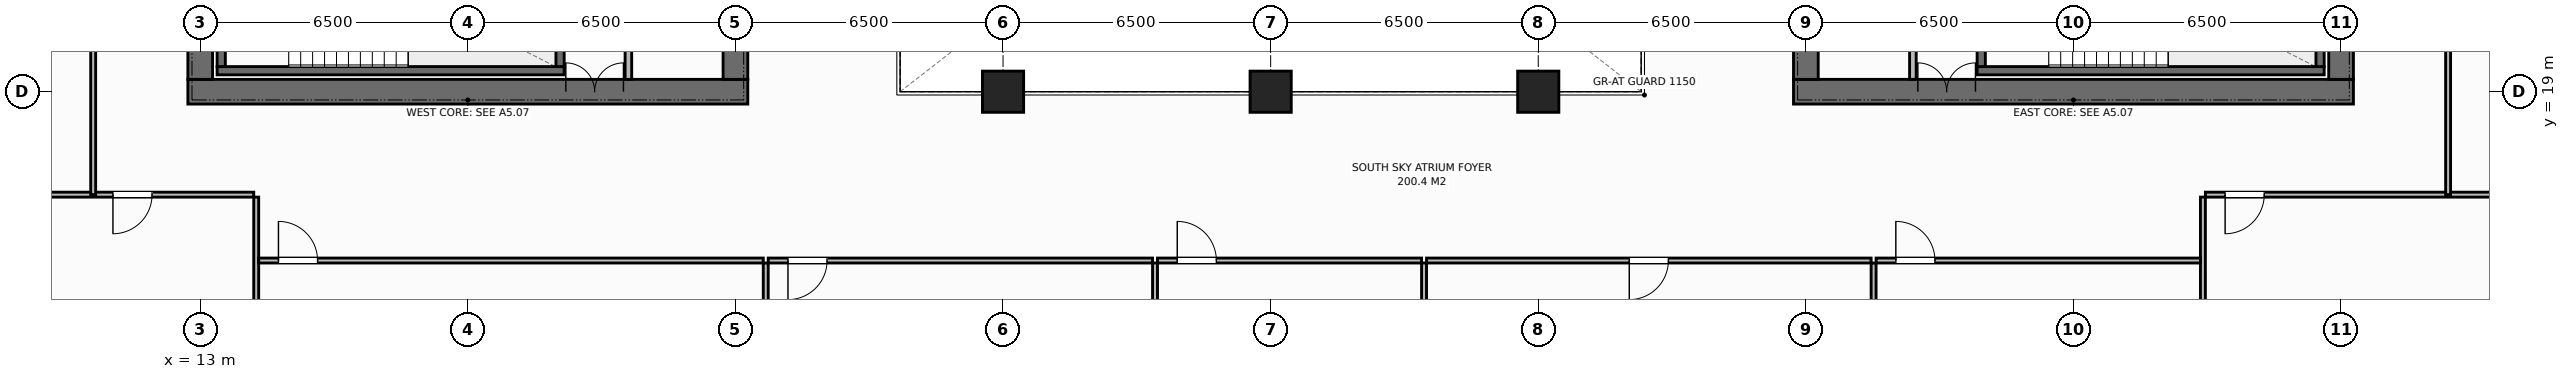
"""IFC4 building model, lengths in metres.
Left out: names, types, materials, properties, quantities, classifications, styles, units other than length and angle.
Written with IfcOpenShell. Run it as: python <this file> out.ifc"""

import sys

from ifc_helpers import new_model, si_unit, direction, frame, frame_2d, origin, origin_2d, place, context, subcontext, project, spatial, rectangle, extrude, element, fill, save


model = new_model("IFC4")
c1 = context("Model", 3, precision=1e-05, world=origin(), true_north=direction((0.0, 1.0)))
c2 = subcontext(c1, "Body", "Model", "MODEL_VIEW")
j1 = project(units=[si_unit("LENGTHUNIT", "METRE"), si_unit("PLANEANGLEUNIT", "RADIAN")], contexts=[c1])
p1 = place(None, origin())
s1 = spatial("IfcSite", under=j1, at=p1, CompositionType="ELEMENT")
p2 = place(p1, origin())
s2 = spatial("IfcBuilding", under=s1, at=p2, CompositionType="ELEMENT")
p3 = place(p2, frame((0.0, 0.0, 163.2)))
s3 = spatial("IfcBuildingStorey", under=s2, at=p3, CompositionType="ELEMENT", Elevation=163.2)
p4 = place(p3, frame((12.7, 19.0, 0.0), z_axis=(0.0, 0.0, 1.0), x_axis=(1.0, 0.0, 0.0)))
e1 = element("IfcWall", 1, at=p4, inside=s3, PredefinedType="SHEAR", context=c2, shape_type="SweptSolid", body=[
    extrude(rectangle(XDim=13.6, YDim=0.6, at=frame_2d((6.8, 0.0))), origin(), (0.0, 0.0, 1.0), 3.8),
])
p5 = place(p4, frame((9.18, 0.0, 0.0)))
e2 = element("IfcOpeningElement", 2, at=p5, cuts=e1, PredefinedType="OPENING", context=c2, shape_type="SweptSolid", body=[
    extrude(rectangle(XDim=1.4, YDim=2.2, at=frame_2d((0.7, 1.1))), frame((0.0, 0.31, 0.0), z_axis=(0.0, -1.0, 0.0), x_axis=(1.0, 0.0, 0.0)), (0.0, 0.0, 1.0), 0.62),
])
p6 = place(p3, frame((13.0, 19.3, 0.0), z_axis=(0.0, 0.0, 1.0), x_axis=(0.0, 1.0, 0.0)))
e3 = element("IfcWall", 3, at=p6, inside=s3, PredefinedType="SHEAR", context=c2, shape_type="SweptSolid", body=[
    extrude(rectangle(XDim=13.4, YDim=0.6, at=frame_2d((6.7, 0.0))), origin(), (0.0, 0.0, 1.0), 3.8),
])
p7 = place(p6, frame((4.75, 0.0, 0.0)))
e4 = element("IfcOpeningElement", 4, at=p7, cuts=e3, PredefinedType="OPENING", context=c2, shape_type="SweptSolid", body=[
    extrude(rectangle(XDim=1.4, YDim=2.2, at=frame_2d((0.7, 1.1))), frame((0.0, 0.31, 0.0), z_axis=(0.0, -1.0, 0.0), x_axis=(1.0, 0.0, 0.0)), (0.0, 0.0, 1.0), 0.62),
])
p8 = place(p3, frame((26.0, 19.3, 0.0), z_axis=(0.0, 0.0, 1.0), x_axis=(0.0, 1.0, 0.0)))
e5 = element("IfcWall", 5, at=p8, inside=s3, PredefinedType="SHEAR", context=c2, shape_type="SweptSolid", body=[
    extrude(rectangle(XDim=13.4, YDim=0.6, at=frame_2d((6.7, 0.0))), origin(), (0.0, 0.0, 1.0), 3.8),
])
p9 = place(p3, frame((51.7, 19.0, 0.0), z_axis=(0.0, 0.0, 1.0), x_axis=(1.0, 0.0, 0.0)))
e6 = element("IfcWall", 6, at=p9, inside=s3, PredefinedType="SHEAR", context=c2, shape_type="SweptSolid", body=[
    extrude(rectangle(XDim=13.6, YDim=0.6, at=frame_2d((6.8, 0.0))), origin(), (0.0, 0.0, 1.0), 3.8),
])
p10 = place(p9, frame((3.02, 0.0, 0.0)))
e7 = element("IfcOpeningElement", 7, at=p10, cuts=e6, PredefinedType="OPENING", context=c2, shape_type="SweptSolid", body=[
    extrude(rectangle(XDim=1.4, YDim=2.2, at=frame_2d((0.7, 1.1))), frame((0.0, 0.31, 0.0), z_axis=(0.0, -1.0, 0.0), x_axis=(1.0, 0.0, 0.0)), (0.0, 0.0, 1.0), 0.62),
])
p11 = place(p3, frame((52.0, 19.3, 0.0), z_axis=(0.0, 0.0, 1.0), x_axis=(0.0, 1.0, 0.0)))
e8 = element("IfcWall", 8, at=p11, inside=s3, PredefinedType="SHEAR", context=c2, shape_type="SweptSolid", body=[
    extrude(rectangle(XDim=13.4, YDim=0.6, at=frame_2d((6.7, 0.0))), origin(), (0.0, 0.0, 1.0), 3.8),
])
p12 = place(p3, frame((65.0, 19.3, 0.0), z_axis=(0.0, 0.0, 1.0), x_axis=(0.0, 1.0, 0.0)))
e9 = element("IfcWall", 9, at=p12, inside=s3, PredefinedType="SHEAR", context=c2, shape_type="SweptSolid", body=[
    extrude(rectangle(XDim=13.4, YDim=0.6, at=frame_2d((6.7, 0.0))), origin(), (0.0, 0.0, 1.0), 3.8),
])
p13 = place(p12, frame((8.15, 0.0, 0.0)))
e10 = element("IfcOpeningElement", 10, at=p13, cuts=e9, PredefinedType="OPENING", context=c2, shape_type="SweptSolid", body=[
    extrude(rectangle(XDim=1.3, YDim=2.2, at=frame_2d((0.65, 1.1))), frame((0.0, 0.31, 0.0), z_axis=(0.0, -1.0, 0.0), x_axis=(1.0, 0.0, 0.0)), (0.0, 0.0, 1.0), 0.62),
])
p14 = place(p3, frame((13.41, 19.51, 0.0), z_axis=(0.0, 0.0, 1.0), x_axis=(1.0, 0.0, 0.0)))
e11 = element("IfcWall", 11, at=p14, inside=s3, PredefinedType="SHEAR", context=c2, shape_type="SweptSolid", body=[
    extrude(rectangle(XDim=8.43, YDim=0.2, at=frame_2d((4.215, 0.0))), origin(), (0.0, 0.0, 1.0), 3.8),
])
for number, where, z_axis, x_axis in (
    (12, (13.51, 19.61, 0.0), (0.0, 0.0, 1.0), (0.0, 1.0, 0.0)),
    (13, (21.74, 19.61, 0.0), (0.0, 0.0, 1.0), (0.0, 1.0, 0.0)),
):
    element("IfcWall", number, at=place(p3, frame(where, z_axis=z_axis, x_axis=x_axis)), inside=s3, PredefinedType="SHEAR", context=c2, shape_type="SweptSolid", body=[
        extrude(rectangle(XDim=3.28, YDim=0.2, at=frame_2d((1.64, 0.0))), origin(), (0.0, 0.0, 1.0), 3.8),
    ])
p15 = place(p3, frame((56.16, 19.51, 0.0), z_axis=(0.0, 0.0, 1.0), x_axis=(1.0, 0.0, 0.0)))
e14 = element("IfcWall", 14, at=p15, inside=s3, PredefinedType="SHEAR", context=c2, shape_type="SweptSolid", body=[
    extrude(rectangle(XDim=8.43, YDim=0.2, at=frame_2d((4.215, 0.0))), origin(), (0.0, 0.0, 1.0), 3.8),
])
for number, where, z_axis, x_axis in (
    (15, (56.26, 19.61, 0.0), (0.0, 0.0, 1.0), (0.0, 1.0, 0.0)),
    (16, (64.49, 19.61, 0.0), (0.0, 0.0, 1.0), (0.0, 1.0, 0.0)),
):
    element("IfcWall", number, at=place(p3, frame(where, z_axis=z_axis, x_axis=x_axis)), inside=s3, PredefinedType="SHEAR", context=c2, shape_type="SweptSolid", body=[
        extrude(rectangle(XDim=3.28, YDim=0.2, at=frame_2d((1.64, 0.0))), origin(), (0.0, 0.0, 1.0), 3.8),
    ])
for number, where, z_axis, x_axis in (
    (17, (32.5, 19.0, 0.0), (0.0, 0.0, 1.0), (1.0, 0.0, 0.0)),
    (18, (39.0, 19.0, 0.0), (0.0, 0.0, 1.0), (1.0, 0.0, 0.0)),
    (19, (45.5, 19.0, 0.0), (0.0, 0.0, 1.0), (1.0, 0.0, 0.0)),
):
    element("IfcColumn", number, at=place(p3, frame(where, z_axis=z_axis, x_axis=x_axis)), inside=s3, PredefinedType="COLUMN", context=c2, shape_type="SweptSolid", body=[
        extrude(rectangle(XDim=1.0, YDim=1.0, at=origin_2d()), origin(), (0.0, 0.0, 1.0), 3.8),
    ])
p16 = place(p3, frame((23.4, 19.3, 0.0), z_axis=(0.0, 0.0, 1.0), x_axis=(0.0, 1.0, 0.0)))
e20 = element("IfcWall", 20, at=p16, inside=s3, PredefinedType="STANDARD", context=c2, shape_type="SweptSolid", body=[
    extrude(rectangle(XDim=13.4, YDim=0.16, at=frame_2d((6.7, 0.0))), origin(), (0.0, 0.0, 1.0), 3.572),
])
p17 = place(p16, frame((2.2, 0.0, 0.0)))
e21 = element("IfcOpeningElement", 21, at=p17, cuts=e20, PredefinedType="OPENING", context=c2, shape_type="SweptSolid", body=[
    extrude(rectangle(XDim=0.95, YDim=2.15, at=frame_2d((0.475, 1.075))), frame((0.0, 0.09, 0.0), z_axis=(0.0, -1.0, 0.0), x_axis=(1.0, 0.0, 0.0)), (0.0, 0.0, 1.0), 0.18),
])
p18 = place(p16, frame((6.3, 0.0, 0.0)))
e22 = element("IfcOpeningElement", 22, at=p18, cuts=e20, PredefinedType="OPENING", context=c2, shape_type="SweptSolid", body=[
    extrude(rectangle(XDim=0.95, YDim=2.15, at=frame_2d((0.475, 1.075))), frame((0.0, 0.09, 0.0), z_axis=(0.0, -1.0, 0.0), x_axis=(1.0, 0.0, 0.0)), (0.0, 0.0, 1.0), 0.18),
])
p19 = place(p16, frame((9.3, 0.0, 0.0)))
e23 = element("IfcOpeningElement", 23, at=p19, cuts=e20, PredefinedType="OPENING", context=c2, shape_type="SweptSolid", body=[
    extrude(rectangle(XDim=1.1, YDim=2.2, at=frame_2d((0.55, 1.1))), frame((0.0, 0.09, 0.0), z_axis=(0.0, -1.0, 0.0), x_axis=(1.0, 0.0, 0.0)), (0.0, 0.0, 1.0), 0.18),
])
p20 = place(p16, frame((11.5, 0.0, 0.0)))
e24 = element("IfcOpeningElement", 24, at=p20, cuts=e20, PredefinedType="OPENING", context=c2, shape_type="SweptSolid", body=[
    extrude(rectangle(XDim=1.1, YDim=2.2, at=frame_2d((0.55, 1.1))), frame((0.0, 0.09, 0.0), z_axis=(0.0, -1.0, 0.0), x_axis=(1.0, 0.0, 0.0)), (0.0, 0.0, 1.0), 0.18),
])
p21 = place(p3, frame((54.6, 19.3, 0.0), z_axis=(0.0, 0.0, 1.0), x_axis=(0.0, 1.0, 0.0)))
e25 = element("IfcWall", 25, at=p21, inside=s3, PredefinedType="STANDARD", context=c2, shape_type="SweptSolid", body=[
    extrude(rectangle(XDim=13.4, YDim=0.16, at=frame_2d((6.7, 0.0))), origin(), (0.0, 0.0, 1.0), 3.572),
])
p22 = place(p21, frame((2.1, 0.0, 0.0)))
e26 = element("IfcOpeningElement", 26, at=p22, cuts=e25, PredefinedType="OPENING", context=c2, shape_type="SweptSolid", body=[
    extrude(rectangle(XDim=0.95, YDim=2.15, at=frame_2d((0.475, 1.075))), frame((0.0, 0.09, 0.0), z_axis=(0.0, -1.0, 0.0), x_axis=(1.0, 0.0, 0.0)), (0.0, 0.0, 1.0), 0.18),
])
p23 = place(p21, frame((6.2, 0.0, 0.0)))
e27 = element("IfcOpeningElement", 27, at=p23, cuts=e25, PredefinedType="OPENING", context=c2, shape_type="SweptSolid", body=[
    extrude(rectangle(XDim=0.95, YDim=2.15, at=frame_2d((0.475, 1.075))), frame((0.0, 0.09, 0.0), z_axis=(0.0, -1.0, 0.0), x_axis=(1.0, 0.0, 0.0)), (0.0, 0.0, 1.0), 0.18),
])
p24 = place(p21, frame((9.3, 0.0, 0.0)))
e28 = element("IfcOpeningElement", 28, at=p24, cuts=e25, PredefinedType="OPENING", context=c2, shape_type="SweptSolid", body=[
    extrude(rectangle(XDim=1.1, YDim=2.2, at=frame_2d((0.55, 1.1))), frame((0.0, 0.09, 0.0), z_axis=(0.0, -1.0, 0.0), x_axis=(1.0, 0.0, 0.0)), (0.0, 0.0, 1.0), 0.18),
])
p25 = place(p21, frame((11.5, 0.0, 0.0)))
e29 = element("IfcOpeningElement", 29, at=p25, cuts=e25, PredefinedType="OPENING", context=c2, shape_type="SweptSolid", body=[
    extrude(rectangle(XDim=1.1, YDim=2.2, at=frame_2d((0.55, 1.1))), frame((0.0, 0.09, 0.0), z_axis=(0.0, -1.0, 0.0), x_axis=(1.0, 0.0, 0.0)), (0.0, 0.0, 1.0), 0.18),
])
p26 = place(p3, frame((14.36, 3.42, 0.0), z_axis=(0.0, 0.0, 1.0), x_axis=(0.0, 1.0, 0.0)))
e30 = element("IfcWall", 30, at=p26, inside=s3, PredefinedType="PARTITIONING", context=c2, shape_type="SweptSolid", body=[
    extrude(rectangle(XDim=13.02, YDim=0.12, at=frame_2d((6.51, 0.0))), origin(), (0.0, 0.0, 1.0), 3.572),
])
p27 = place(p3, frame((3.98, 16.5, 0.0), z_axis=(0.0, 0.0, 1.0), x_axis=(1.0, 0.0, 0.0)))
e31 = element("IfcWall", 31, at=p27, inside=s3, PredefinedType="PARTITIONING", context=c2, shape_type="SweptSolid", body=[
    extrude(rectangle(XDim=10.32, YDim=0.12, at=frame_2d((5.16, 0.0))), origin(), (0.0, 0.0, 1.0), 3.572),
])
p28 = place(p27, frame((6.9, 0.0, 0.0)))
e32 = element("IfcOpeningElement", 32, at=p28, cuts=e31, PredefinedType="OPENING", context=c2, shape_type="SweptSolid", body=[
    extrude(rectangle(XDim=0.95, YDim=2.15, at=frame_2d((0.475, 1.075))), frame((0.0, 0.07, 0.0), z_axis=(0.0, -1.0, 0.0), x_axis=(1.0, 0.0, 0.0)), (0.0, 0.0, 1.0), 0.14),
])
p29 = place(p3, frame((26.736, 3.42, 0.0), z_axis=(0.0, 0.0, 1.0), x_axis=(0.0, 1.0, 0.0)))
e33 = element("IfcWall", 33, at=p29, inside=s3, PredefinedType="PARTITIONING", context=c2, shape_type="SweptSolid", body=[
    extrude(rectangle(XDim=11.42, YDim=0.12, at=frame_2d((5.71, 0.0))), origin(), (0.0, 0.0, 1.0), 3.572),
])
p30 = place(p3, frame((14.42, 14.9, 0.0), z_axis=(0.0, 0.0, 1.0), x_axis=(1.0, 0.0, 0.0)))
e34 = element("IfcWall", 34, at=p30, inside=s3, PredefinedType="PARTITIONING", context=c2, shape_type="SweptSolid", body=[
    extrude(rectangle(XDim=12.256, YDim=0.12, at=frame_2d((6.128, 0.0))), origin(), (0.0, 0.0, 1.0), 3.572),
])
p31 = place(p30, frame((0.48, 0.0, 0.0)))
e35 = element("IfcOpeningElement", 35, at=p31, cuts=e34, PredefinedType="OPENING", context=c2, shape_type="SweptSolid", body=[
    extrude(rectangle(XDim=0.95, YDim=2.15, at=frame_2d((0.475, 1.075))), frame((0.0, 0.07, 0.0), z_axis=(0.0, -1.0, 0.0), x_axis=(1.0, 0.0, 0.0)), (0.0, 0.0, 1.0), 0.14),
])
p32 = place(p3, frame((36.191, 3.42, 0.0), z_axis=(0.0, 0.0, 1.0), x_axis=(0.0, 1.0, 0.0)))
e36 = element("IfcWall", 36, at=p32, inside=s3, PredefinedType="PARTITIONING", context=c2, shape_type="SweptSolid", body=[
    extrude(rectangle(XDim=11.42, YDim=0.12, at=frame_2d((5.71, 0.0))), origin(), (0.0, 0.0, 1.0), 3.572),
])
p33 = place(p3, frame((26.796, 14.9, 0.0), z_axis=(0.0, 0.0, 1.0), x_axis=(1.0, 0.0, 0.0)))
e37 = element("IfcWall", 37, at=p33, inside=s3, PredefinedType="PARTITIONING", context=c2, shape_type="SweptSolid", body=[
    extrude(rectangle(XDim=9.335, YDim=0.12, at=frame_2d((4.668, 0.0))), origin(), (0.0, 0.0, 1.0), 3.572),
])
p34 = place(p33, frame((0.48, 0.0, 0.0)))
e38 = element("IfcOpeningElement", 38, at=p34, cuts=e37, PredefinedType="OPENING", context=c2, shape_type="SweptSolid", body=[
    extrude(rectangle(XDim=0.95, YDim=2.15, at=frame_2d((0.475, 1.075))), frame((0.0, 0.07, 0.0), z_axis=(0.0, -1.0, 0.0), x_axis=(1.0, 0.0, 0.0)), (0.0, 0.0, 1.0), 0.14),
])
p35 = place(p3, frame((42.726, 3.42, 0.0), z_axis=(0.0, 0.0, 1.0), x_axis=(0.0, 1.0, 0.0)))
e39 = element("IfcWall", 39, at=p35, inside=s3, PredefinedType="PARTITIONING", context=c2, shape_type="SweptSolid", body=[
    extrude(rectangle(XDim=11.42, YDim=0.12, at=frame_2d((5.71, 0.0))), origin(), (0.0, 0.0, 1.0), 3.572),
])
p36 = place(p3, frame((36.251, 14.9, 0.0), z_axis=(0.0, 0.0, 1.0), x_axis=(1.0, 0.0, 0.0)))
e40 = element("IfcWall", 40, at=p36, inside=s3, PredefinedType="PARTITIONING", context=c2, shape_type="SweptSolid", body=[
    extrude(rectangle(XDim=6.415, YDim=0.12, at=frame_2d((3.207, 0.0))), origin(), (0.0, 0.0, 1.0), 3.572),
])
p37 = place(p36, frame((0.48, 0.0, 0.0)))
e41 = element("IfcOpeningElement", 41, at=p37, cuts=e40, PredefinedType="OPENING", context=c2, shape_type="SweptSolid", body=[
    extrude(rectangle(XDim=0.95, YDim=2.15, at=frame_2d((0.475, 1.075))), frame((0.0, 0.07, 0.0), z_axis=(0.0, -1.0, 0.0), x_axis=(1.0, 0.0, 0.0)), (0.0, 0.0, 1.0), 0.14),
])
p38 = place(p3, frame((53.646, 3.42, 0.0), z_axis=(0.0, 0.0, 1.0), x_axis=(0.0, 1.0, 0.0)))
e42 = element("IfcWall", 42, at=p38, inside=s3, PredefinedType="PARTITIONING", context=c2, shape_type="SweptSolid", body=[
    extrude(rectangle(XDim=11.42, YDim=0.12, at=frame_2d((5.71, 0.0))), origin(), (0.0, 0.0, 1.0), 3.572),
])
p39 = place(p3, frame((42.786, 14.9, 0.0), z_axis=(0.0, 0.0, 1.0), x_axis=(1.0, 0.0, 0.0)))
e43 = element("IfcWall", 43, at=p39, inside=s3, PredefinedType="PARTITIONING", context=c2, shape_type="SweptSolid", body=[
    extrude(rectangle(XDim=10.799, YDim=0.12, at=frame_2d((5.4, 0.0))), origin(), (0.0, 0.0, 1.0), 3.572),
])
p40 = place(p39, frame((4.925, 0.0, 0.0)))
e44 = element("IfcOpeningElement", 44, at=p40, cuts=e43, PredefinedType="OPENING", context=c2, shape_type="SweptSolid", body=[
    extrude(rectangle(XDim=0.95, YDim=2.15, at=frame_2d((0.475, 1.075))), frame((0.0, 0.07, 0.0), z_axis=(0.0, -1.0, 0.0), x_axis=(1.0, 0.0, 0.0)), (0.0, 0.0, 1.0), 0.14),
])
p41 = place(p3, frame((61.644, 3.42, 0.0), z_axis=(0.0, 0.0, 1.0), x_axis=(0.0, 1.0, 0.0)))
e45 = element("IfcWall", 45, at=p41, inside=s3, PredefinedType="PARTITIONING", context=c2, shape_type="SweptSolid", body=[
    extrude(rectangle(XDim=13.02, YDim=0.12, at=frame_2d((6.51, 0.0))), origin(), (0.0, 0.0, 1.0), 3.572),
])
p42 = place(p3, frame((53.705, 14.9, 0.0), z_axis=(0.0, 0.0, 1.0), x_axis=(1.0, 0.0, 0.0)))
e46 = element("IfcWall", 46, at=p42, inside=s3, PredefinedType="PARTITIONING", context=c2, shape_type="SweptSolid", body=[
    extrude(rectangle(XDim=7.879, YDim=0.12, at=frame_2d((3.939, 0.0))), origin(), (0.0, 0.0, 1.0), 3.572),
])
p43 = place(p42, frame((0.48, 0.0, 0.0)))
e47 = element("IfcOpeningElement", 47, at=p43, cuts=e46, PredefinedType="OPENING", context=c2, shape_type="SweptSolid", body=[
    extrude(rectangle(XDim=0.95, YDim=2.15, at=frame_2d((0.475, 1.075))), frame((0.0, 0.07, 0.0), z_axis=(0.0, -1.0, 0.0), x_axis=(1.0, 0.0, 0.0)), (0.0, 0.0, 1.0), 0.14),
])
p44 = place(p3, frame((61.704, 16.5, 0.0), z_axis=(0.0, 0.0, 1.0), x_axis=(1.0, 0.0, 0.0)))
e48 = element("IfcWall", 48, at=p44, inside=s3, PredefinedType="PARTITIONING", context=c2, shape_type="SweptSolid", body=[
    extrude(rectangle(XDim=12.316, YDim=0.12, at=frame_2d((6.158, 0.0))), origin(), (0.0, 0.0, 1.0), 3.572),
])
p45 = place(p44, frame((0.48, 0.0, 0.0)))
e49 = element("IfcOpeningElement", 49, at=p45, cuts=e48, PredefinedType="OPENING", context=c2, shape_type="SweptSolid", body=[
    extrude(rectangle(XDim=0.95, YDim=2.15, at=frame_2d((0.475, 1.075))), frame((0.0, 0.07, 0.0), z_axis=(0.0, -1.0, 0.0), x_axis=(1.0, 0.0, 0.0)), (0.0, 0.0, 1.0), 0.14),
])
p46 = place(p3, frame((10.4, 16.5, 0.0), z_axis=(0.0, 0.0, 1.0), x_axis=(0.0, 1.0, 0.0)))
e50 = element("IfcWall", 50, at=p46, inside=s3, PredefinedType="PARTITIONING", context=c2, shape_type="SweptSolid", body=[
    extrude(rectangle(XDim=19.0, YDim=0.12, at=frame_2d((9.5, 0.0))), origin(), (0.0, 0.0, 1.0), 3.572),
])
p47 = place(p46, frame((9.025, 0.0, 0.0)))
e51 = element("IfcOpeningElement", 51, at=p47, cuts=e50, PredefinedType="OPENING", context=c2, shape_type="SweptSolid", body=[
    extrude(rectangle(XDim=0.95, YDim=2.15, at=frame_2d((0.475, 1.075))), frame((0.0, 0.07, 0.0), z_axis=(0.0, -1.0, 0.0), x_axis=(1.0, 0.0, 0.0)), (0.0, 0.0, 1.0), 0.14),
])
p48 = place(p3, frame((67.6, 16.5, 0.0), z_axis=(0.0, 0.0, 1.0), x_axis=(0.0, 1.0, 0.0)))
e52 = element("IfcWall", 52, at=p48, inside=s3, PredefinedType="PARTITIONING", context=c2, shape_type="SweptSolid", body=[
    extrude(rectangle(XDim=9.5, YDim=0.12, at=frame_2d((4.75, 0.0))), origin(), (0.0, 0.0, 1.0), 3.572),
])
p49 = place(p48, frame((5.325, 0.0, 0.0)))
e53 = element("IfcOpeningElement", 53, at=p49, cuts=e52, PredefinedType="OPENING", context=c2, shape_type="SweptSolid", body=[
    extrude(rectangle(XDim=0.95, YDim=2.15, at=frame_2d((0.475, 1.075))), frame((0.0, 0.07, 0.0), z_axis=(0.0, -1.0, 0.0), x_axis=(1.0, 0.0, 0.0)), (0.0, 0.0, 1.0), 0.14),
])
p50 = place(p5, origin())
e54 = element("IfcDoor", 54, at=p50, inside=s3, OperationType="DOUBLE_DOOR_SINGLE_SWING", PredefinedType="DOOR", context=c2, shape_type="SweptSolid", body=[
    extrude(rectangle(XDim=1.4, YDim=2.2, at=frame_2d((0.7, 1.1))), frame((0.0, 0.075, 0.0), z_axis=(0.0, -1.0, 0.0), x_axis=(1.0, 0.0, 0.0)), (0.0, 0.0, 1.0), 0.05),
])
fill(e2, e54)
p51 = place(p10, origin())
e55 = element("IfcDoor", 55, at=p51, inside=s3, OperationType="DOUBLE_DOOR_SINGLE_SWING", PredefinedType="DOOR", context=c2, shape_type="SweptSolid", body=[
    extrude(rectangle(XDim=1.4, YDim=2.2, at=frame_2d((0.7, 1.1))), frame((0.0, 0.075, 0.0), z_axis=(0.0, -1.0, 0.0), x_axis=(1.0, 0.0, 0.0)), (0.0, 0.0, 1.0), 0.05),
])
fill(e7, e55)
p52 = place(p28, origin())
e56 = element("IfcDoor", 56, at=p52, inside=s3, OperationType="SINGLE_SWING_RIGHT", PredefinedType="DOOR", context=c2, shape_type="SweptSolid", body=[
    extrude(rectangle(XDim=0.95, YDim=2.15, at=frame_2d((0.475, 1.075))), frame((0.0, 0.025, 0.0), z_axis=(0.0, -1.0, 0.0), x_axis=(1.0, 0.0, 0.0)), (0.0, 0.0, 1.0), 0.05),
])
fill(e32, e56)
p53 = place(p31, origin())
e57 = element("IfcDoor", 57, at=p53, inside=s3, OperationType="SINGLE_SWING_LEFT", PredefinedType="DOOR", context=c2, shape_type="SweptSolid", body=[
    extrude(rectangle(XDim=0.95, YDim=2.15, at=frame_2d((0.475, 1.075))), frame((0.0, 0.025, 0.0), z_axis=(0.0, -1.0, 0.0), x_axis=(1.0, 0.0, 0.0)), (0.0, 0.0, 1.0), 0.05),
])
fill(e35, e57)
p54 = place(p34, origin())
e58 = element("IfcDoor", 58, at=p54, inside=s3, OperationType="SINGLE_SWING_RIGHT", PredefinedType="DOOR", context=c2, shape_type="SweptSolid", body=[
    extrude(rectangle(XDim=0.95, YDim=2.15, at=frame_2d((0.475, 1.075))), frame((0.0, 0.025, 0.0), z_axis=(0.0, -1.0, 0.0), x_axis=(1.0, 0.0, 0.0)), (0.0, 0.0, 1.0), 0.05),
])
fill(e38, e58)
p55 = place(p37, origin())
e59 = element("IfcDoor", 59, at=p55, inside=s3, OperationType="SINGLE_SWING_LEFT", PredefinedType="DOOR", context=c2, shape_type="SweptSolid", body=[
    extrude(rectangle(XDim=0.95, YDim=2.15, at=frame_2d((0.475, 1.075))), frame((0.0, 0.025, 0.0), z_axis=(0.0, -1.0, 0.0), x_axis=(1.0, 0.0, 0.0)), (0.0, 0.0, 1.0), 0.05),
])
fill(e41, e59)
p56 = place(p40, origin())
e60 = element("IfcDoor", 60, at=p56, inside=s3, OperationType="SINGLE_SWING_RIGHT", PredefinedType="DOOR", context=c2, shape_type="SweptSolid", body=[
    extrude(rectangle(XDim=0.95, YDim=2.15, at=frame_2d((0.475, 1.075))), frame((0.0, 0.025, 0.0), z_axis=(0.0, -1.0, 0.0), x_axis=(1.0, 0.0, 0.0)), (0.0, 0.0, 1.0), 0.05),
])
fill(e44, e60)
p57 = place(p43, origin())
e61 = element("IfcDoor", 61, at=p57, inside=s3, OperationType="SINGLE_SWING_LEFT", PredefinedType="DOOR", context=c2, shape_type="SweptSolid", body=[
    extrude(rectangle(XDim=0.95, YDim=2.15, at=frame_2d((0.475, 1.075))), frame((0.0, 0.025, 0.0), z_axis=(0.0, -1.0, 0.0), x_axis=(1.0, 0.0, 0.0)), (0.0, 0.0, 1.0), 0.05),
])
fill(e47, e61)
p58 = place(p45, origin())
e62 = element("IfcDoor", 62, at=p58, inside=s3, OperationType="SINGLE_SWING_RIGHT", PredefinedType="DOOR", context=c2, shape_type="SweptSolid", body=[
    extrude(rectangle(XDim=0.95, YDim=2.15, at=frame_2d((0.475, 1.075))), frame((0.0, 0.025, 0.0), z_axis=(0.0, -1.0, 0.0), x_axis=(1.0, 0.0, 0.0)), (0.0, 0.0, 1.0), 0.05),
])
fill(e49, e62)
save(model, sys.argv[1])
